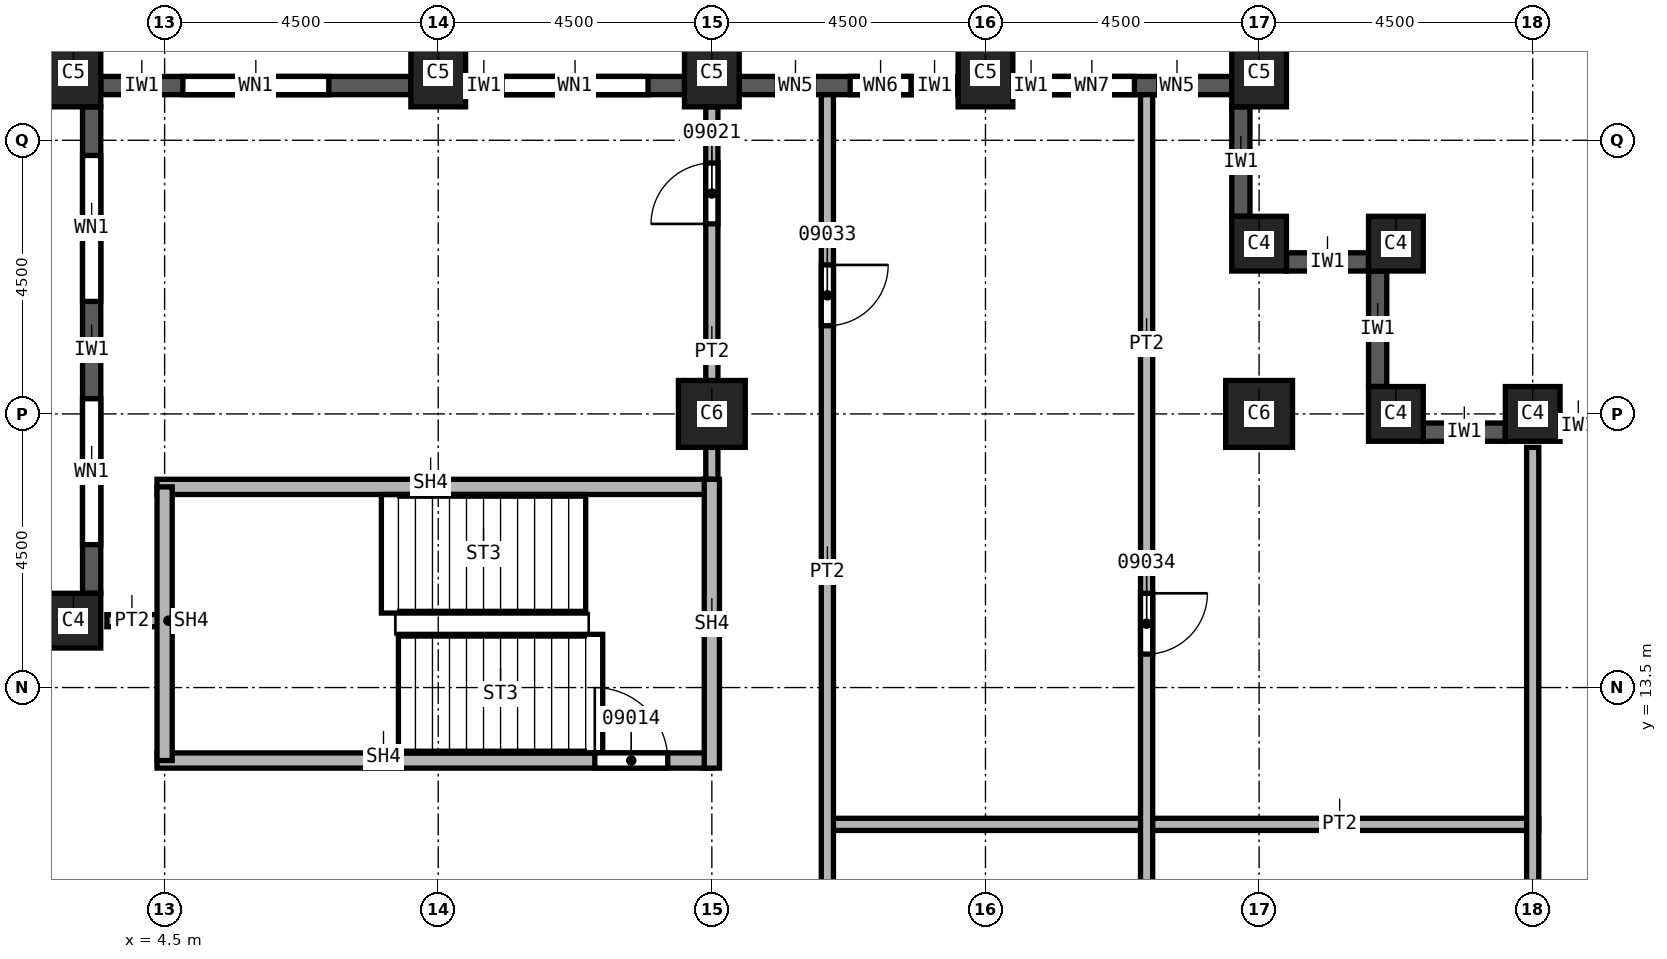
"""IFC4 building model, lengths in metres.
Left out: names, types, materials, properties, quantities, classifications, styles, units other than length and angle.
Written with IfcOpenShell. Run it as: python <this file> out.ifc"""

import sys

from ifc_helpers import new_model, si_unit, direction, frame, frame_2d, origin, origin_2d, place, context, subcontext, project, spatial, rectangle, extrude, element, fill, save


model = new_model("IFC4")
c1 = context("Model", 3, precision=1e-05, world=origin(), true_north=direction((0.0, 1.0)))
c2 = subcontext(c1, "Body", "Model", "MODEL_VIEW")
j1 = project(units=[si_unit("LENGTHUNIT", "METRE"), si_unit("PLANEANGLEUNIT", "RADIAN")], contexts=[c1])
p1 = place(None, origin())
s1 = spatial("IfcSite", under=j1, at=p1, CompositionType="ELEMENT")
p2 = place(p1, origin())
s2 = spatial("IfcBuilding", under=s1, at=p2, CompositionType="ELEMENT")
p3 = place(p2, frame((0.0, 0.0, 162.0)))
s3 = spatial("IfcBuildingStorey", under=s2, at=p3, CompositionType="ELEMENT", Elevation=162.0)
for number, where, z_axis, x_axis in (
    (1, (13.5, 18.0, 0.0), (0.0, 0.0, 1.0), (1.0, 0.0, 0.0)),
    (2, (22.5, 18.0, 0.0), (0.0, 0.0, 1.0), (1.0, 0.0, 0.0)),
):
    element("IfcColumn", number, at=place(p3, frame(where, z_axis=z_axis, x_axis=x_axis)), inside=s3, PredefinedType="COLUMN", context=c2, shape_type="SweptSolid", body=[
        extrude(rectangle(XDim=1.1, YDim=1.1, at=origin_2d()), origin(), (0.0, 0.0, 1.0), 3.7),
    ])
p4 = place(p3, frame((27.0, 18.0, 0.0), z_axis=(0.0, 0.0, 1.0), x_axis=(1.0, 0.0, 0.0)))
e3 = element("IfcColumn", 3, at=p4, inside=s3, PredefinedType="COLUMN", context=c2, shape_type="SweptSolid", body=[
    extrude(rectangle(XDim=0.9, YDim=0.9, at=origin_2d()), origin(), (0.0, 0.0, 1.0), 3.7),
])
for number, where, z_axis, x_axis in (
    (4, (3.0, 23.6, 0.0), (0.0, 0.0, 1.0), (1.0, 0.0, 0.0)),
    (5, (9.0, 23.6, 0.0), (0.0, 0.0, 1.0), (1.0, 0.0, 0.0)),
    (6, (13.5, 23.6, 0.0), (0.0, 0.0, 1.0), (1.0, 0.0, 0.0)),
    (7, (18.0, 23.6, 0.0), (0.0, 0.0, 1.0), (1.0, 0.0, 0.0)),
    (8, (22.5, 23.6, 0.0), (0.0, 0.0, 1.0), (1.0, 0.0, 0.0)),
):
    element("IfcColumn", number, at=place(p3, frame(where, z_axis=z_axis, x_axis=x_axis)), inside=s3, PredefinedType="COLUMN", context=c2, shape_type="SweptSolid", body=[
        extrude(rectangle(XDim=0.9, YDim=1.1, at=origin_2d()), origin(), (0.0, 0.0, 1.0), 3.7),
    ])
for number, where, z_axis, x_axis in (
    (9, (3.0, 14.6, 0.0), (0.0, 0.0, 1.0), (1.0, 0.0, 0.0)),
    (10, (22.5, 20.8, 0.0), (0.0, 0.0, 1.0), (1.0, 0.0, 0.0)),
    (11, (24.75, 20.8, 0.0), (0.0, 0.0, 1.0), (1.0, 0.0, 0.0)),
    (12, (24.75, 18.0, 0.0), (0.0, 0.0, 1.0), (1.0, 0.0, 0.0)),
):
    element("IfcColumn", number, at=place(p3, frame(where, z_axis=z_axis, x_axis=x_axis)), inside=s3, PredefinedType="COLUMN", context=c2, shape_type="SweptSolid", body=[
        extrude(rectangle(XDim=0.9, YDim=0.9, at=origin_2d()), origin(), (0.0, 0.0, 1.0), 3.7),
    ])
p5 = place(p3, frame((31.05, 17.8, 0.0), z_axis=(0.0, 0.0, 1.0), x_axis=(-1.0, 0.0, 0.0)))
e13 = element("IfcWall", 13, at=p5, inside=s3, PredefinedType="SOLIDWALL", context=c2, shape_type="SweptSolid", body=[
    extrude(rectangle(XDim=3.6, YDim=0.3, at=frame_2d((1.8, 0.0))), origin(), (0.0, 0.0, 1.0), 3.1),
])
p6 = place(p5, frame((0.6, 0.0, 0.8)))
e14 = element("IfcOpeningElement", 14, at=p6, cuts=e13, PredefinedType="OPENING", context=c2, shape_type="SweptSolid", body=[
    extrude(rectangle(XDim=2.4, YDim=1.95, at=frame_2d((1.2, 0.975))), frame((0.0, 0.15, 0.0), z_axis=(0.0, -1.0, 0.0), x_axis=(1.0, 0.0, 0.0)), (0.0, 0.0, 1.0), 0.3),
])
p7 = place(p3, frame((26.55, 17.7, 0.0), z_axis=(0.0, 0.0, 1.0), x_axis=(-1.0, 0.0, 0.0)))
e15 = element("IfcWall", 15, at=p7, inside=s3, PredefinedType="SOLIDWALL", context=c2, shape_type="SweptSolid", body=[
    extrude(rectangle(XDim=1.35, YDim=0.3, at=frame_2d((0.675, 0.0))), origin(), (0.0, 0.0, 1.0), 3.1),
])
p8 = place(p3, frame((24.45, 18.45, 0.0), z_axis=(0.0, 0.0, 1.0), x_axis=(0.0, 1.0, 0.0)))
e16 = element("IfcWall", 16, at=p8, inside=s3, PredefinedType="SOLIDWALL", context=c2, shape_type="SweptSolid", body=[
    extrude(rectangle(XDim=1.9, YDim=0.3, at=frame_2d((0.95, 0.0))), origin(), (0.0, 0.0, 1.0), 3.1),
])
p9 = place(p3, frame((24.3, 20.5, 0.0), z_axis=(0.0, 0.0, 1.0), x_axis=(-1.0, 0.0, 0.0)))
e17 = element("IfcWall", 17, at=p9, inside=s3, PredefinedType="SOLIDWALL", context=c2, shape_type="SweptSolid", body=[
    extrude(rectangle(XDim=1.35, YDim=0.3, at=frame_2d((0.675, 0.0))), origin(), (0.0, 0.0, 1.0), 3.1),
])
p10 = place(p3, frame((22.2, 21.25, 0.0), z_axis=(0.0, 0.0, 1.0), x_axis=(0.0, 1.0, 0.0)))
e18 = element("IfcWall", 18, at=p10, inside=s3, PredefinedType="SOLIDWALL", context=c2, shape_type="SweptSolid", body=[
    extrude(rectangle(XDim=1.8, YDim=0.3, at=frame_2d((0.9, 0.0))), origin(), (0.0, 0.0, 1.0), 3.1),
])
p11 = place(p3, frame((22.05, 23.4, 0.0), z_axis=(0.0, 0.0, 1.0), x_axis=(-1.0, 0.0, 0.0)))
e19 = element("IfcWall", 19, at=p11, inside=s3, PredefinedType="SOLIDWALL", context=c2, shape_type="SweptSolid", body=[
    extrude(rectangle(XDim=3.6, YDim=0.3, at=frame_2d((1.8, 0.0))), origin(), (0.0, 0.0, 1.0), 3.1),
])
p12 = place(p11, frame((0.6, 0.0, 0.8)))
e20 = element("IfcOpeningElement", 20, at=p12, cuts=e19, PredefinedType="OPENING", context=c2, shape_type="SweptSolid", body=[
    extrude(rectangle(XDim=0.6, YDim=1.95, at=frame_2d((0.3, 0.975))), frame((0.0, 0.15, 0.0), z_axis=(0.0, -1.0, 0.0), x_axis=(1.0, 0.0, 0.0)), (0.0, 0.0, 1.0), 0.3),
])
p13 = place(p11, frame((1.6, 0.0, 0.8)))
e21 = element("IfcOpeningElement", 21, at=p13, cuts=e19, PredefinedType="OPENING", context=c2, shape_type="SweptSolid", body=[
    extrude(rectangle(XDim=1.4, YDim=1.95, at=frame_2d((0.7, 0.975))), frame((0.0, 0.15, 0.0), z_axis=(0.0, -1.0, 0.0), x_axis=(1.0, 0.0, 0.0)), (0.0, 0.0, 1.0), 0.3),
])
p14 = place(p3, frame((17.55, 23.4, 0.0), z_axis=(0.0, 0.0, 1.0), x_axis=(-1.0, 0.0, 0.0)))
e22 = element("IfcWall", 22, at=p14, inside=s3, PredefinedType="SOLIDWALL", context=c2, shape_type="SweptSolid", body=[
    extrude(rectangle(XDim=3.6, YDim=0.3, at=frame_2d((1.8, 0.0))), origin(), (0.0, 0.0, 1.0), 3.1),
])
p15 = place(p14, frame((0.775, 0.0, 0.8)))
e23 = element("IfcOpeningElement", 23, at=p15, cuts=e22, PredefinedType="OPENING", context=c2, shape_type="SweptSolid", body=[
    extrude(rectangle(XDim=1.0, YDim=1.95, at=frame_2d((0.5, 0.975))), frame((0.0, 0.15, 0.0), z_axis=(0.0, -1.0, 0.0), x_axis=(1.0, 0.0, 0.0)), (0.0, 0.0, 1.0), 0.3),
])
p16 = place(p14, frame((2.375, 0.0, 0.8)))
e24 = element("IfcOpeningElement", 24, at=p16, cuts=e22, PredefinedType="OPENING", context=c2, shape_type="SweptSolid", body=[
    extrude(rectangle(XDim=0.6, YDim=1.95, at=frame_2d((0.3, 0.975))), frame((0.0, 0.15, 0.0), z_axis=(0.0, -1.0, 0.0), x_axis=(1.0, 0.0, 0.0)), (0.0, 0.0, 1.0), 0.3),
])
p17 = place(p3, frame((13.05, 23.4, 0.0), z_axis=(0.0, 0.0, 1.0), x_axis=(-1.0, 0.0, 0.0)))
e25 = element("IfcWall", 25, at=p17, inside=s3, PredefinedType="SOLIDWALL", context=c2, shape_type="SweptSolid", body=[
    extrude(rectangle(XDim=3.6, YDim=0.3, at=frame_2d((1.8, 0.0))), origin(), (0.0, 0.0, 1.0), 3.1),
])
p18 = place(p17, frame((0.6, 0.0, 0.8)))
e26 = element("IfcOpeningElement", 26, at=p18, cuts=e25, PredefinedType="OPENING", context=c2, shape_type="SweptSolid", body=[
    extrude(rectangle(XDim=2.4, YDim=1.95, at=frame_2d((1.2, 0.975))), frame((0.0, 0.15, 0.0), z_axis=(0.0, -1.0, 0.0), x_axis=(1.0, 0.0, 0.0)), (0.0, 0.0, 1.0), 0.3),
])
p19 = place(p3, frame((8.55, 23.4, 0.0), z_axis=(0.0, 0.0, 1.0), x_axis=(-1.0, 0.0, 0.0)))
e27 = element("IfcWall", 27, at=p19, inside=s3, PredefinedType="SOLIDWALL", context=c2, shape_type="SweptSolid", body=[
    extrude(rectangle(XDim=5.1, YDim=0.3, at=frame_2d((2.55, 0.0))), origin(), (0.0, 0.0, 1.0), 3.1),
])
p20 = place(p19, frame((1.35, 0.0, 0.8)))
e28 = element("IfcOpeningElement", 28, at=p20, cuts=e27, PredefinedType="OPENING", context=c2, shape_type="SweptSolid", body=[
    extrude(rectangle(XDim=2.4, YDim=1.95, at=frame_2d((1.2, 0.975))), frame((0.0, 0.15, 0.0), z_axis=(0.0, -1.0, 0.0), x_axis=(1.0, 0.0, 0.0)), (0.0, 0.0, 1.0), 0.3),
])
p21 = place(p3, frame((3.3, 23.05, 0.0), z_axis=(0.0, 0.0, 1.0), x_axis=(0.0, -1.0, 0.0)))
e29 = element("IfcWall", 29, at=p21, inside=s3, PredefinedType="SOLIDWALL", context=c2, shape_type="SweptSolid", body=[
    extrude(rectangle(XDim=8.0, YDim=0.3, at=frame_2d((4.0, 0.0))), origin(), (0.0, 0.0, 1.0), 3.1),
])
p22 = place(p21, frame((0.8, 0.0, 0.8)))
e30 = element("IfcOpeningElement", 30, at=p22, cuts=e29, PredefinedType="OPENING", context=c2, shape_type="SweptSolid", body=[
    extrude(rectangle(XDim=2.4, YDim=1.95, at=frame_2d((1.2, 0.975))), frame((0.0, 0.15, 0.0), z_axis=(0.0, -1.0, 0.0), x_axis=(1.0, 0.0, 0.0)), (0.0, 0.0, 1.0), 0.3),
])
p23 = place(p21, frame((4.8, 0.0, 0.8)))
e31 = element("IfcOpeningElement", 31, at=p23, cuts=e29, PredefinedType="OPENING", context=c2, shape_type="SweptSolid", body=[
    extrude(rectangle(XDim=2.4, YDim=1.95, at=frame_2d((1.2, 0.975))), frame((0.0, 0.15, 0.0), z_axis=(0.0, -1.0, 0.0), x_axis=(1.0, 0.0, 0.0)), (0.0, 0.0, 1.0), 0.3),
])
p24 = place(p3, frame((3.55, 14.6, 0.0), z_axis=(0.0, 0.0, 1.0), x_axis=(1.0, 0.0, 0.0)))
e32 = element("IfcWall", 32, at=p24, inside=s3, PredefinedType="PARTITIONING", context=c2, shape_type="SweptSolid", body=[
    extrude(rectangle(XDim=0.95, YDim=0.2, at=frame_2d((0.475, 0.0))), origin(), (0.0, 0.0, 1.0), 3.7),
])
p25 = place(p3, frame((13.5, 16.675, 0.0), z_axis=(0.0, 0.0, 1.0), x_axis=(0.0, 1.0, 0.0)))
e33 = element("IfcWall", 33, at=p25, inside=s3, PredefinedType="PARTITIONING", context=c2, shape_type="SweptSolid", body=[
    extrude(rectangle(XDim=6.375, YDim=0.2, at=frame_2d((3.188, 0.0))), origin(), (0.0, 0.0, 1.0), 3.7),
])
p26 = place(p25, frame((4.45, 0.0, 0.0)))
e34 = element("IfcOpeningElement", 34, at=p26, cuts=e33, PredefinedType="OPENING", context=c2, shape_type="SweptSolid", body=[
    extrude(rectangle(XDim=1.0, YDim=2.1, at=frame_2d((0.5, 1.05))), frame((0.0, 0.1, 0.0), z_axis=(0.0, -1.0, 0.0), x_axis=(1.0, 0.0, 0.0)), (0.0, 0.0, 1.0), 0.2),
])
p27 = place(p3, frame((15.4, 11.25, 0.0), z_axis=(0.0, 0.0, 1.0), x_axis=(1.0, 0.0, 0.0)))
e35 = element("IfcWall", 35, at=p27, inside=s3, PredefinedType="PARTITIONING", context=c2, shape_type="SweptSolid", body=[
    extrude(rectangle(XDim=11.7, YDim=0.2, at=frame_2d((5.85, 0.0))), origin(), (0.0, 0.0, 1.0), 3.7),
])
p28 = place(p3, frame((15.4, 23.25, 0.0), z_axis=(0.0, 0.0, 1.0), x_axis=(0.0, -1.0, 0.0)))
e36 = element("IfcWall", 36, at=p28, inside=s3, PredefinedType="PARTITIONING", context=c2, shape_type="SweptSolid", body=[
    extrude(rectangle(XDim=24.1, YDim=0.2, at=frame_2d((12.05, 0.0))), origin(), (0.0, 0.0, 1.0), 3.7),
])
p29 = place(p28, frame((16.65, 0.0, 0.0)))
e37 = element("IfcOpeningElement", 37, at=p29, cuts=e36, PredefinedType="OPENING", context=c2, shape_type="SweptSolid", body=[
    extrude(rectangle(XDim=1.0, YDim=2.1, at=frame_2d((0.5, 1.05))), frame((0.0, 0.1, 0.0), z_axis=(0.0, -1.0, 0.0), x_axis=(1.0, 0.0, 0.0)), (0.0, 0.0, 1.0), 0.2),
])
p30 = place(p28, frame((2.8, 0.0, 0.0)))
e38 = element("IfcOpeningElement", 38, at=p30, cuts=e36, PredefinedType="OPENING", context=c2, shape_type="SweptSolid", body=[
    extrude(rectangle(XDim=1.0, YDim=2.1, at=frame_2d((0.5, 1.05))), frame((0.0, 0.1, 0.0), z_axis=(0.0, -1.0, 0.0), x_axis=(1.0, 0.0, 0.0)), (0.0, 0.0, 1.0), 0.2),
])
p31 = place(p3, frame((20.65, 23.25, 0.0), z_axis=(0.0, 0.0, 1.0), x_axis=(0.0, -1.0, 0.0)))
e39 = element("IfcWall", 39, at=p31, inside=s3, PredefinedType="PARTITIONING", context=c2, shape_type="SweptSolid", body=[
    extrude(rectangle(XDim=24.0, YDim=0.2, at=frame_2d((12.0, 0.0))), origin(), (0.0, 0.0, 1.0), 3.7),
])
p32 = place(p31, frame((15.6, 0.0, 0.0)))
e40 = element("IfcOpeningElement", 40, at=p32, cuts=e39, PredefinedType="OPENING", context=c2, shape_type="SweptSolid", body=[
    extrude(rectangle(XDim=1.0, YDim=2.1, at=frame_2d((0.5, 1.05))), frame((0.0, 0.1, 0.0), z_axis=(0.0, -1.0, 0.0), x_axis=(1.0, 0.0, 0.0)), (0.0, 0.0, 1.0), 0.2),
])
p33 = place(p31, frame((8.2, 0.0, 0.0)))
e41 = element("IfcOpeningElement", 41, at=p33, cuts=e39, PredefinedType="OPENING", context=c2, shape_type="SweptSolid", body=[
    extrude(rectangle(XDim=1.0, YDim=2.1, at=frame_2d((0.5, 1.05))), frame((0.0, 0.1, 0.0), z_axis=(0.0, -1.0, 0.0), x_axis=(1.0, 0.0, 0.0)), (0.0, 0.0, 1.0), 0.2),
])
p34 = place(p3, frame((27.0, 17.45, 0.0), z_axis=(0.0, 0.0, 1.0), x_axis=(0.0, -1.0, 0.0)))
e42 = element("IfcWall", 42, at=p34, inside=s3, PredefinedType="PARTITIONING", context=c2, shape_type="SweptSolid", body=[
    extrude(rectangle(XDim=18.2, YDim=0.2, at=frame_2d((9.1, 0.0))), origin(), (0.0, 0.0, 1.0), 3.7),
])
p35 = place(p3, frame((4.375, 12.3, 0.0), z_axis=(0.0, 0.0, 1.0), x_axis=(1.0, 0.0, 0.0)))
e43 = element("IfcWall", 43, at=p35, inside=s3, PredefinedType="SOLIDWALL", context=c2, shape_type="SweptSolid", body=[
    extrude(rectangle(XDim=9.125, YDim=0.25, at=frame_2d((4.562, 0.0))), origin(), (0.0, 0.0, 1.0), 3.7),
])
p36 = place(p35, frame((7.2, 0.0, 0.0)))
e44 = element("IfcOpeningElement", 44, at=p36, cuts=e43, PredefinedType="OPENING", context=c2, shape_type="SweptSolid", body=[
    extrude(rectangle(XDim=1.2, YDim=2.1, at=frame_2d((0.6, 1.05))), frame((0.0, 0.125, 0.0), z_axis=(0.0, -1.0, 0.0), x_axis=(1.0, 0.0, 0.0)), (0.0, 0.0, 1.0), 0.25),
])
p37 = place(p3, frame((4.375, 16.8, 0.0), z_axis=(0.0, 0.0, 1.0), x_axis=(1.0, 0.0, 0.0)))
e45 = element("IfcWall", 45, at=p37, inside=s3, PredefinedType="SOLIDWALL", context=c2, shape_type="SweptSolid", body=[
    extrude(rectangle(XDim=9.125, YDim=0.25, at=frame_2d((4.562, 0.0))), origin(), (0.0, 0.0, 1.0), 3.7),
])
p38 = place(p3, frame((4.5, 12.3, 0.0), z_axis=(0.0, 0.0, 1.0), x_axis=(0.0, 1.0, 0.0)))
e46 = element("IfcWall", 46, at=p38, inside=s3, PredefinedType="SOLIDWALL", context=c2, shape_type="SweptSolid", body=[
    extrude(rectangle(XDim=4.5, YDim=0.25, at=frame_2d((2.25, 0.0))), origin(), (0.0, 0.0, 1.0), 3.7),
])
p39 = place(p3, frame((13.5, 12.175, 0.0), z_axis=(0.0, 0.0, 1.0), x_axis=(0.0, 1.0, 0.0)))
e47 = element("IfcWall", 47, at=p39, inside=s3, PredefinedType="SOLIDWALL", context=c2, shape_type="SweptSolid", body=[
    extrude(rectangle(XDim=4.75, YDim=0.25, at=frame_2d((2.375, 0.0))), origin(), (0.0, 0.0, 1.0), 3.7),
])
p40 = place(p18, origin())
e48 = element("IfcWindow", 48, at=p40, inside=s3, PartitioningType="SINGLE_PANEL", PredefinedType="WINDOW", context=c2, shape_type="SweptSolid", body=[
    extrude(rectangle(XDim=2.4, YDim=1.95, at=frame_2d((1.2, 0.975))), frame((0.0, 0.03, 0.0), z_axis=(0.0, -1.0, 0.0), x_axis=(1.0, 0.0, 0.0)), (0.0, 0.0, 1.0), 0.06),
])
fill(e26, e48)
p41 = place(p20, origin())
e49 = element("IfcWindow", 49, at=p41, inside=s3, PartitioningType="SINGLE_PANEL", PredefinedType="WINDOW", context=c2, shape_type="SweptSolid", body=[
    extrude(rectangle(XDim=2.4, YDim=1.95, at=frame_2d((1.2, 0.975))), frame((0.0, 0.03, 0.0), z_axis=(0.0, -1.0, 0.0), x_axis=(1.0, 0.0, 0.0)), (0.0, 0.0, 1.0), 0.06),
])
fill(e28, e49)
p42 = place(p22, origin())
e50 = element("IfcWindow", 50, at=p42, inside=s3, PartitioningType="SINGLE_PANEL", PredefinedType="WINDOW", context=c2, shape_type="SweptSolid", body=[
    extrude(rectangle(XDim=2.4, YDim=1.95, at=frame_2d((1.2, 0.975))), frame((0.0, 0.03, 0.0), z_axis=(0.0, -1.0, 0.0), x_axis=(1.0, 0.0, 0.0)), (0.0, 0.0, 1.0), 0.06),
])
fill(e30, e50)
p43 = place(p23, origin())
e51 = element("IfcWindow", 51, at=p43, inside=s3, PartitioningType="SINGLE_PANEL", PredefinedType="WINDOW", context=c2, shape_type="SweptSolid", body=[
    extrude(rectangle(XDim=2.4, YDim=1.95, at=frame_2d((1.2, 0.975))), frame((0.0, 0.03, 0.0), z_axis=(0.0, -1.0, 0.0), x_axis=(1.0, 0.0, 0.0)), (0.0, 0.0, 1.0), 0.06),
])
fill(e31, e51)
p44 = place(p36, origin())
e52 = element("IfcDoor", 52, at=p44, inside=s3, OperationType="SINGLE_SWING_LEFT", PredefinedType="DOOR", context=c2, shape_type="SweptSolid", body=[
    extrude(rectangle(XDim=1.2, YDim=2.1, at=frame_2d((0.6, 1.05))), frame((0.0, 0.025, 0.0), z_axis=(0.0, -1.0, 0.0), x_axis=(1.0, 0.0, 0.0)), (0.0, 0.0, 1.0), 0.05),
])
fill(e44, e52)
p45 = place(p26, origin())
e53 = element("IfcDoor", 53, at=p45, inside=s3, OperationType="SINGLE_SWING_RIGHT", PredefinedType="DOOR", context=c2, shape_type="SweptSolid", body=[
    extrude(rectangle(XDim=1.0, YDim=2.1, at=frame_2d((0.5, 1.05))), frame((0.0, 0.025, 0.0), z_axis=(0.0, -1.0, 0.0), x_axis=(1.0, 0.0, 0.0)), (0.0, 0.0, 1.0), 0.05),
])
fill(e34, e53)
p46 = place(p30, origin())
e54 = element("IfcDoor", 54, at=p46, inside=s3, OperationType="SINGLE_SWING_RIGHT", PredefinedType="DOOR", context=c2, shape_type="SweptSolid", body=[
    extrude(rectangle(XDim=1.0, YDim=2.1, at=frame_2d((0.5, 1.05))), frame((0.0, 0.025, 0.0), z_axis=(0.0, -1.0, 0.0), x_axis=(1.0, 0.0, 0.0)), (0.0, 0.0, 1.0), 0.05),
])
fill(e38, e54)
p47 = place(p33, origin())
e55 = element("IfcDoor", 55, at=p47, inside=s3, OperationType="SINGLE_SWING_LEFT", PredefinedType="DOOR", context=c2, shape_type="SweptSolid", body=[
    extrude(rectangle(XDim=1.0, YDim=2.1, at=frame_2d((0.5, 1.05))), frame((0.0, 0.025, 0.0), z_axis=(0.0, -1.0, 0.0), x_axis=(1.0, 0.0, 0.0)), (0.0, 0.0, 1.0), 0.05),
])
fill(e41, e55)
p48 = place(p12, origin())
e56 = element("IfcWindow", 56, at=p48, inside=s3, PartitioningType="SINGLE_PANEL", PredefinedType="WINDOW", context=c2, shape_type="SweptSolid", body=[
    extrude(rectangle(XDim=0.6, YDim=1.95, at=frame_2d((0.3, 0.975))), frame((0.0, 0.03, 0.0), z_axis=(0.0, -1.0, 0.0), x_axis=(1.0, 0.0, 0.0)), (0.0, 0.0, 1.0), 0.06),
])
fill(e20, e56)
p49 = place(p13, origin())
e57 = element("IfcWindow", 57, at=p49, inside=s3, PartitioningType="SINGLE_PANEL", PredefinedType="WINDOW", context=c2, shape_type="SweptSolid", body=[
    extrude(rectangle(XDim=1.4, YDim=1.95, at=frame_2d((0.7, 0.975))), frame((0.0, 0.03, 0.0), z_axis=(0.0, -1.0, 0.0), x_axis=(1.0, 0.0, 0.0)), (0.0, 0.0, 1.0), 0.06),
])
fill(e21, e57)
p50 = place(p15, origin())
e58 = element("IfcWindow", 58, at=p50, inside=s3, PartitioningType="SINGLE_PANEL", PredefinedType="WINDOW", context=c2, shape_type="SweptSolid", body=[
    extrude(rectangle(XDim=1.0, YDim=1.95, at=frame_2d((0.5, 0.975))), frame((0.0, 0.03, 0.0), z_axis=(0.0, -1.0, 0.0), x_axis=(1.0, 0.0, 0.0)), (0.0, 0.0, 1.0), 0.06),
])
fill(e23, e58)
p51 = place(p16, origin())
e59 = element("IfcWindow", 59, at=p51, inside=s3, PartitioningType="SINGLE_PANEL", PredefinedType="WINDOW", context=c2, shape_type="SweptSolid", body=[
    extrude(rectangle(XDim=0.6, YDim=1.95, at=frame_2d((0.3, 0.975))), frame((0.0, 0.03, 0.0), z_axis=(0.0, -1.0, 0.0), x_axis=(1.0, 0.0, 0.0)), (0.0, 0.0, 1.0), 0.06),
])
fill(e24, e59)
save(model, sys.argv[1])
